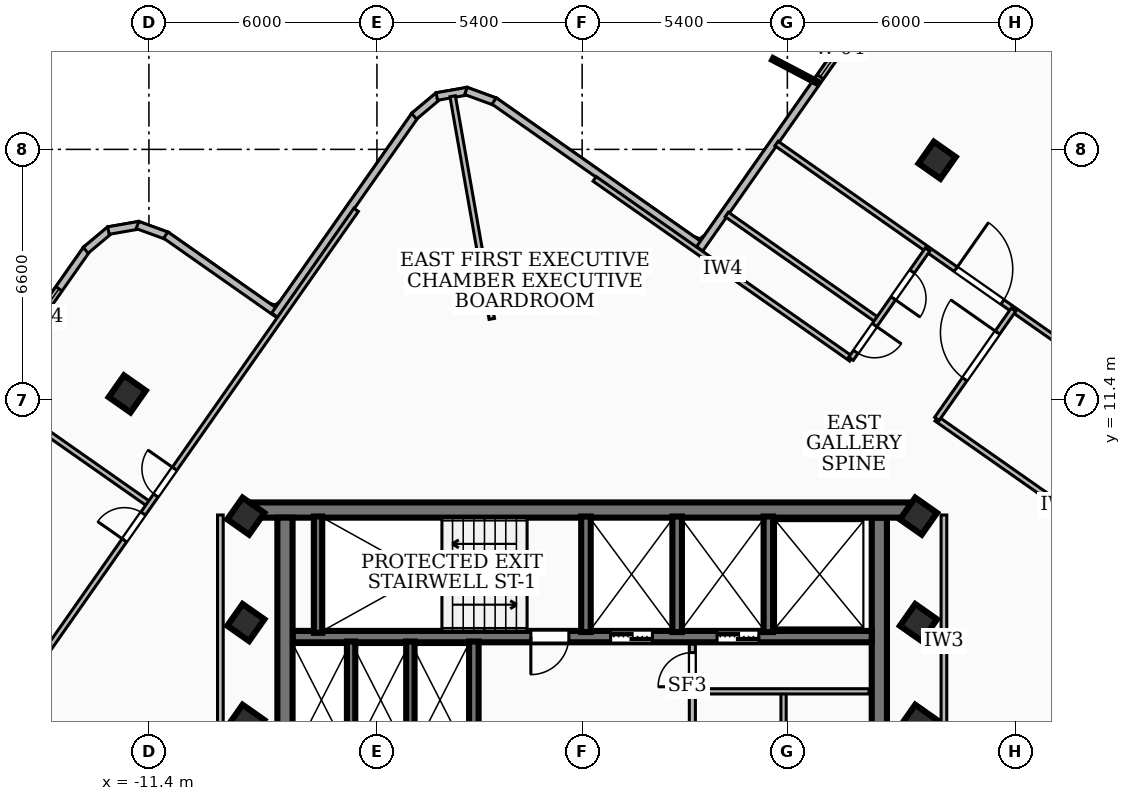
"""IFC4 building model, lengths in metres.
Left out: names, types, materials, properties, quantities, classifications, styles, units other than length and angle.
Written with IfcOpenShell. Run it as: python <this file> out.ifc"""

import sys

from ifc_helpers import new_model, si_unit, direction, frame, frame_2d, origin, origin_2d, place, context, subcontext, project, spatial, rectangle, extrude, element, fill, save


model = new_model("IFC4")
c1 = context("Model", 3, precision=1e-05, world=origin(), true_north=direction((0.0, 1.0)))
c2 = subcontext(c1, "Body", "Model", "MODEL_VIEW")
j1 = project(units=[si_unit("LENGTHUNIT", "METRE"), si_unit("PLANEANGLEUNIT", "RADIAN")], contexts=[c1])
p1 = place(None, origin())
s1 = spatial("IfcSite", under=j1, at=p1, CompositionType="ELEMENT")
p2 = place(p1, origin())
s2 = spatial("IfcBuilding", under=s1, at=p2, CompositionType="ELEMENT")
p3 = place(p2, frame((0.0, 0.0, 264.6)))
s3 = spatial("IfcBuildingStorey", under=s2, at=p3, CompositionType="ELEMENT", Elevation=264.6)
p4 = place(p3, frame((-8.78, 8.51, 0.0), z_axis=(0.0, 0.0, 1.0), x_axis=(1.0, 0.0, 0.0)))
e1 = element("IfcWall", 1, at=p4, inside=s3, PredefinedType="SHEAR", context=c2, shape_type="SweptSolid", body=[
    extrude(rectangle(XDim=17.56, YDim=0.4, at=frame_2d((8.78, 0.0))), origin(), (0.0, 0.0, 1.0), 3.16),
])
for number, where, z_axis, x_axis in (
    (2, (-7.82, 1.95, 0.0), (0.0, 0.0, 1.0), (0.0, 1.0, 0.0)),
    (3, (7.82, 8.31, 0.0), (0.0, 0.0, 1.0), (0.0, -1.0, 0.0)),
):
    element("IfcWall", number, at=place(p3, frame(where, z_axis=z_axis, x_axis=x_axis)), inside=s3, PredefinedType="SHEAR", context=c2, shape_type="SweptSolid", body=[
        extrude(rectangle(XDim=6.36, YDim=0.4, at=frame_2d((3.18, 0.0))), origin(), (0.0, 0.0, 1.0), 3.16),
    ])
p5 = place(p3, frame((7.62, 5.18, 0.0), z_axis=(0.0, 0.0, 1.0), x_axis=(-1.0, 0.0, 0.0)))
e4 = element("IfcWall", 4, at=p5, inside=s3, PredefinedType="SOLIDWALL", context=c2, shape_type="SweptSolid", body=[
    extrude(rectangle(XDim=15.24, YDim=0.3, at=frame_2d((7.62, 0.0))), origin(), (0.0, 0.0, 1.0), 3.16),
])
p6 = place(p5, frame((5.77, 0.0, 0.0)))
e5 = element("IfcOpeningElement", 5, at=p6, cuts=e4, PredefinedType="OPENING", context=c2, shape_type="SweptSolid", body=[
    extrude(rectangle(XDim=1.1, YDim=2.15, at=frame_2d((0.55, 1.075))), frame((0.0, 0.16, 0.0), z_axis=(0.0, -1.0, 0.0), x_axis=(1.0, 0.0, 0.0)), (0.0, 0.0, 1.0), 0.32),
])
p7 = place(p5, frame((2.97, 0.0, 0.0)))
e6 = element("IfcOpeningElement", 6, at=p7, cuts=e4, PredefinedType="OPENING", context=c2, shape_type="SweptSolid", body=[
    extrude(rectangle(XDim=1.1, YDim=2.15, at=frame_2d((0.55, 1.075))), frame((0.0, 0.16, 0.0), z_axis=(0.0, -1.0, 0.0), x_axis=(1.0, 0.0, 0.0)), (0.0, 0.0, 1.0), 0.32),
])
p8 = place(p5, frame((7.97, 0.0, 0.0)))
e7 = element("IfcOpeningElement", 7, at=p8, cuts=e4, PredefinedType="OPENING", context=c2, shape_type="SweptSolid", body=[
    extrude(rectangle(XDim=1.0, YDim=2.1, at=frame_2d((0.5, 1.05))), frame((0.0, 0.16, 0.0), z_axis=(0.0, -1.0, 0.0), x_axis=(1.0, 0.0, 0.0)), (0.0, 0.0, 1.0), 0.32),
])
p9 = place(p3, frame((-6.95, 5.28, 0.0), z_axis=(0.0, 0.0, 1.0), x_axis=(0.0, 1.0, 0.0)))
e8 = element("IfcWall", 8, at=p9, inside=s3, PredefinedType="SOLIDWALL", context=c2, shape_type="SweptSolid", body=[
    extrude(rectangle(XDim=3.06, YDim=0.22, at=frame_2d((1.53, 0.0))), origin(), (0.0, 0.0, 1.0), 3.16),
])
for number, where, z_axis, x_axis in (
    (9, (0.1, 5.3, 0.0), (0.0, 0.0, 1.0), (0.0, 1.0, 0.0)),
    (10, (2.5, 5.3, 0.0), (0.0, 0.0, 1.0), (0.0, 1.0, 0.0)),
    (11, (4.9, 5.3, 0.0), (0.0, 0.0, 1.0), (0.0, 1.0, 0.0)),
):
    element("IfcWall", number, at=place(p3, frame(where, z_axis=z_axis, x_axis=x_axis)), inside=s3, PredefinedType="SOLIDWALL", context=c2, shape_type="SweptSolid", body=[
        extrude(rectangle(XDim=3.04, YDim=0.25, at=frame_2d((1.52, 0.0))), origin(), (0.0, 0.0, 1.0), 3.16),
    ])
p10 = place(p3, frame((-2.85, 1.98, 0.0), z_axis=(0.0, 0.0, 1.0), x_axis=(0.0, 1.0, 0.0)))
e12 = element("IfcWall", 12, at=p10, inside=s3, PredefinedType="SOLIDWALL", context=c2, shape_type="SweptSolid", body=[
    extrude(rectangle(XDim=3.07, YDim=0.25, at=frame_2d((1.535, 0.0))), origin(), (0.0, 0.0, 1.0), 3.16),
])
for number, where, z_axis, x_axis in (
    (13, (-6.08, 1.98, 0.0), (0.0, 0.0, 1.0), (0.0, 1.0, 0.0)),
    (14, (-4.52, 1.98, 0.0), (0.0, 0.0, 1.0), (0.0, 1.0, 0.0)),
):
    element("IfcWall", number, at=place(p3, frame(where, z_axis=z_axis, x_axis=x_axis)), inside=s3, PredefinedType="SOLIDWALL", context=c2, shape_type="SweptSolid", body=[
        extrude(rectangle(XDim=3.07, YDim=0.22, at=frame_2d((1.535, 0.0))), origin(), (0.0, 0.0, 1.0), 3.16),
    ])
for number, where, z_axis, x_axis in (
    (15, (-8.85, 2.9, 0.0), (0.0, 0.0, 1.0), (0.574, 0.819, 0.0)),
    (16, (-8.85, 5.55, 0.0), (0.0, 0.0, 1.0), (0.574, 0.819, 0.0)),
    (17, (8.85, 2.9, 0.0), (0.0, 0.0, 1.0), (0.574, 0.819, 0.0)),
    (18, (8.85, 5.55, 0.0), (0.0, 0.0, 1.0), (0.574, 0.819, 0.0)),
    (19, (-8.85, 8.35, 0.0), (0.0, 0.0, 1.0), (0.574, 0.819, 0.0)),
    (20, (8.85, 8.35, 0.0), (0.0, 0.0, 1.0), (0.574, 0.819, 0.0)),
    (21, (9.341, 17.714, 0.0), (0.0, 0.0, 1.0), (0.574, 0.819, 0.0)),
    (22, (-11.971, 11.566, 0.0), (0.0, 0.0, 1.0), (0.574, 0.819, 0.0)),
):
    element("IfcColumn", number, at=place(p3, frame(where, z_axis=z_axis, x_axis=x_axis)), inside=s3, PredefinedType="COLUMN", context=c2, shape_type="SweptSolid", body=[
        extrude(rectangle(XDim=0.7, YDim=0.7, at=origin_2d()), origin(), (0.0, 0.0, 1.0), 3.42),
    ])
p11 = place(p3, frame((-18.728, 7.257, 0.0), z_axis=(0.0, 0.0, 1.0), x_axis=(0.574152395536, 0.818748451419, 0.0)))
e23 = element("IfcWall", 23, at=p11, inside=s3, PredefinedType="SOLIDWALL", context=c2, shape_type="SweptSolid", body=[
    extrude(rectangle(XDim=9.923, YDim=0.2, at=frame_2d((4.961, 0.0))), origin(), (0.0, 0.0, 1.0), 3.16),
])
p12 = place(p11, frame((6.84, 0.0, 0.85)))
e24 = element("IfcOpeningElement", 24, at=p12, cuts=e23, PredefinedType="OPENING", context=c2, shape_type="SweptSolid", body=[
    extrude(rectangle(XDim=1.8, YDim=2.0, at=frame_2d((0.9, 1.0))), frame((0.0, 0.11, 0.0), z_axis=(0.0, -1.0, 0.0), x_axis=(1.0, 0.0, 0.0)), (0.0, 0.0, 1.0), 0.22),
])
p13 = place(p3, frame((-13.064, 15.345, 0.0), z_axis=(0.0, 0.0, 1.0), x_axis=(0.766330415365, 0.642446647191, 0.0)))
e25 = element("IfcWall", 25, at=p13, inside=s3, PredefinedType="SOLIDWALL", context=c2, shape_type="SweptSolid", body=[
    extrude(rectangle(XDim=0.838, YDim=0.2, at=frame_2d((0.419, 0.0))), origin(), (0.0, 0.0, 1.0), 3.16),
])
p14 = place(p3, frame((-12.466, 15.863, 0.0), z_axis=(0.0, 0.0, 1.0), x_axis=(0.985118245285, 0.171877988141, 0.0)))
e26 = element("IfcWall", 26, at=p14, inside=s3, PredefinedType="SOLIDWALL", context=c2, shape_type="SweptSolid", body=[
    extrude(rectangle(XDim=0.825, YDim=0.2, at=frame_2d((0.413, 0.0))), origin(), (0.0, 0.0, 1.0), 3.16),
])
p15 = place(p3, frame((-11.701, 16.01, 0.0), z_axis=(0.0, 0.0, 1.0), x_axis=(0.939042573482, -0.343800880145, 0.0)))
e27 = element("IfcWall", 27, at=p15, inside=s3, PredefinedType="SOLIDWALL", context=c2, shape_type="SweptSolid", body=[
    extrude(rectangle(XDim=0.838, YDim=0.2, at=frame_2d((0.419, 0.0))), origin(), (0.0, 0.0, 1.0), 3.16),
])
p16 = place(p3, frame((-10.957, 15.745, 0.0), z_axis=(0.0, 0.0, 1.0), x_axis=(0.818576054501, -0.574398157202, 0.0)))
e28 = element("IfcWall", 28, at=p16, inside=s3, PredefinedType="SOLIDWALL", context=c2, shape_type="SweptSolid", body=[
    extrude(rectangle(XDim=3.64, YDim=0.2, at=frame_2d((1.82, 0.0))), origin(), (0.0, 0.0, 1.0), 3.16),
])
p17 = place(p3, frame((-8.088, 13.635, 0.0), z_axis=(0.0, 0.0, 1.0), x_axis=(0.574286279317, 0.818654548261, 0.0)))
e29 = element("IfcWall", 29, at=p17, inside=s3, PredefinedType="SOLIDWALL", context=c2, shape_type="SweptSolid", body=[
    extrude(rectangle(XDim=6.441, YDim=0.2, at=frame_2d((3.22, 0.0))), origin(), (0.0, 0.0, 1.0), 3.16),
])
p18 = place(p3, frame((-4.422, 18.872, 0.0), z_axis=(0.0, 0.0, 1.0), x_axis=(0.766020352528, 0.642816318642, 0.0)))
e30 = element("IfcWall", 30, at=p18, inside=s3, PredefinedType="SOLIDWALL", context=c2, shape_type="SweptSolid", body=[
    extrude(rectangle(XDim=0.838, YDim=0.2, at=frame_2d((0.419, 0.0))), origin(), (0.0, 0.0, 1.0), 3.16),
])
p19 = place(p3, frame((-3.824, 19.391, 0.0), z_axis=(0.0, 0.0, 1.0), x_axis=(0.985118245285, 0.171877988141, 0.0)))
e31 = element("IfcWall", 31, at=p19, inside=s3, PredefinedType="SOLIDWALL", context=c2, shape_type="SweptSolid", body=[
    extrude(rectangle(XDim=0.825, YDim=0.2, at=frame_2d((0.413, 0.0))), origin(), (0.0, 0.0, 1.0), 3.16),
])
p20 = place(p3, frame((-3.059, 19.538, 0.0), z_axis=(0.0, 0.0, 1.0), x_axis=(0.938939131905, -0.344083284363, 0.0)))
e32 = element("IfcWall", 32, at=p20, inside=s3, PredefinedType="SOLIDWALL", context=c2, shape_type="SweptSolid", body=[
    extrude(rectangle(XDim=0.837, YDim=0.2, at=frame_2d((0.418, 0.0))), origin(), (0.0, 0.0, 1.0), 3.16),
])
p21 = place(p3, frame((-2.316, 19.273, 0.0), z_axis=(0.0, 0.0, 1.0), x_axis=(0.818695592978, -0.574227764949, 0.0)))
e33 = element("IfcWall", 33, at=p21, inside=s3, PredefinedType="SOLIDWALL", context=c2, shape_type="SweptSolid", body=[
    extrude(rectangle(XDim=6.741, YDim=0.2, at=frame_2d((3.371, 0.0))), origin(), (0.0, 0.0, 1.0), 3.16),
])
p22 = place(p3, frame((3.092, 15.383, 0.0), z_axis=(0.0, 0.0, 1.0), x_axis=(0.574207723227, 0.818709649746, 0.0)))
e34 = element("IfcWall", 34, at=p22, inside=s3, PredefinedType="SOLIDWALL", context=c2, shape_type="SweptSolid", body=[
    extrude(rectangle(XDim=8.241, YDim=0.2, at=frame_2d((4.12, 0.0))), origin(), (0.0, 0.0, 1.0), 3.16),
])
p23 = place(p22, frame((5.528, 0.0, 0.85)))
e35 = element("IfcOpeningElement", 35, at=p23, cuts=e34, PredefinedType="OPENING", context=c2, shape_type="SweptSolid", body=[
    extrude(rectangle(XDim=1.8, YDim=2.0, at=frame_2d((0.9, 1.0))), frame((0.0, 0.11, 0.0), z_axis=(0.0, -1.0, 0.0), x_axis=(1.0, 0.0, 0.0)), (0.0, 0.0, 1.0), 0.22),
])
p24 = place(p3, frame((9.898, 22.494, 0.0), z_axis=(0.0, 0.0, 1.0), x_axis=(0.818760017785, -0.5741359014, 0.0)))
e36 = element("IfcWall", 36, at=p24, inside=s3, PredefinedType="SOLIDWALL", context=c2, shape_type="SweptSolid", body=[
    extrude(rectangle(XDim=9.922, YDim=0.2, at=frame_2d((4.961, 0.0))), origin(), (0.0, 0.0, 1.0), 3.16),
])
p25 = place(p24, frame((6.84, 0.0, 0.85)))
e37 = element("IfcOpeningElement", 37, at=p25, cuts=e36, PredefinedType="OPENING", context=c2, shape_type="SweptSolid", body=[
    extrude(rectangle(XDim=1.8, YDim=1.8, at=frame_2d((0.9, 0.9))), frame((0.0, 0.11, 0.0), z_axis=(0.0, -1.0, 0.0), x_axis=(1.0, 0.0, 0.0)), (0.0, 0.0, 1.0), 0.22),
])
p26 = place(p3, frame((2.9, 2.04, 0.0), z_axis=(0.0, 0.0, 1.0), x_axis=(0.0, 1.0, 0.0)))
e38 = element("IfcWall", 38, at=p26, inside=s3, PredefinedType="PARTITIONING", context=c2, shape_type="SweptSolid", body=[
    extrude(rectangle(XDim=2.94, YDim=0.16, at=frame_2d((1.47, 0.0))), origin(), (0.0, 0.0, 1.0), 2.39),
])
p27 = place(p26, frame((1.82, 0.0, 0.0)))
e39 = element("IfcOpeningElement", 39, at=p27, cuts=e38, PredefinedType="OPENING", context=c2, shape_type="SweptSolid", body=[
    extrude(rectangle(XDim=0.9, YDim=2.06, at=frame_2d((0.45, 1.03))), frame((0.0, 0.09, 0.0), z_axis=(0.0, -1.0, 0.0), x_axis=(1.0, 0.0, 0.0)), (0.0, 0.0, 1.0), 0.18),
])
p28 = place(p3, frame((2.9, 3.74, 0.0), z_axis=(0.0, 0.0, 1.0), x_axis=(1.0, 0.0, 0.0)))
e40 = element("IfcWall", 40, at=p28, inside=s3, PredefinedType="PARTITIONING", context=c2, shape_type="SweptSolid", body=[
    extrude(rectangle(XDim=4.65, YDim=0.138, at=frame_2d((2.325, 0.0))), origin(), (0.0, 0.0, 1.0), 3.16),
])
p29 = place(p3, frame((5.3, 1.85, 0.0), z_axis=(0.0, 0.0, 1.0), x_axis=(0.0, 1.0, 0.0)))
e41 = element("IfcWall", 41, at=p29, inside=s3, PredefinedType="PARTITIONING", context=c2, shape_type="SweptSolid", body=[
    extrude(rectangle(XDim=1.89, YDim=0.138, at=frame_2d((0.945, 0.0))), origin(), (0.0, 0.0, 1.0), 2.39),
])
p30 = place(p3, frame((-9.52, 1.75, 0.0), z_axis=(0.0, 0.0, 1.0), x_axis=(0.0, 1.0, 0.0)))
e42 = element("IfcWall", 42, at=p30, inside=s3, PredefinedType="PARTITIONING", context=c2, shape_type="SweptSolid", body=[
    extrude(rectangle(XDim=6.63, YDim=0.15, at=frame_2d((3.315, 0.0))), origin(), (0.0, 0.0, 1.0), 2.53),
])
p31 = place(p3, frame((9.52, 1.75, 0.0), z_axis=(0.0, 0.0, 1.0), x_axis=(0.0, 1.0, 0.0)))
e43 = element("IfcWall", 43, at=p31, inside=s3, PredefinedType="PARTITIONING", context=c2, shape_type="SweptSolid", body=[
    extrude(rectangle(XDim=6.63, YDim=0.15, at=frame_2d((3.315, 0.0))), origin(), (0.0, 0.0, 1.0), 3.16),
])
p32 = place(p3, frame((-2.378, 13.54, 0.0), z_axis=(0.0, 0.0, 1.0), x_axis=(-0.173019547247, 0.984918390665, 0.0)))
e44 = element("IfcWall", 44, at=p32, inside=s3, PredefinedType="PARTITIONING", context=c2, shape_type="SweptSolid", body=[
    extrude(rectangle(XDim=5.948, YDim=0.145, at=frame_2d((2.974, 0.0))), origin(), (0.0, 0.0, 1.0), 3.16),
])
p33 = place(p3, frame((11.3, 1.985, 0.0), z_axis=(0.0, 0.0, 1.0), x_axis=(0.984932365377, 0.172939976965, 0.0)))
e45 = element("IfcWall", 45, at=p33, inside=s3, PredefinedType="PARTITIONING", context=c2, shape_type="SweptSolid", body=[
    extrude(rectangle(XDim=8.222, YDim=0.145, at=frame_2d((4.111, 0.0))), origin(), (0.0, 0.0, 1.0), 3.16),
])
p34 = place(p3, frame((7.083, 12.487, 0.0), z_axis=(0.0, 0.0, 1.0), x_axis=(-0.818818791344, 0.574052076855, 0.0)))
e46 = element("IfcWall", 46, at=p34, inside=s3, PredefinedType="PARTITIONING", context=c2, shape_type="SweptSolid", body=[
    extrude(rectangle(XDim=8.25, YDim=0.145, at=frame_2d((4.125, 0.0))), origin(), (0.0, 0.0, 1.0), 3.16),
])
p35 = place(p3, frame((15.835, 6.349, 0.0), z_axis=(0.0, 0.0, 1.0), x_axis=(-0.818780073776, 0.57410729902, 0.0)))
e47 = element("IfcWall", 47, at=p35, inside=s3, PredefinedType="PARTITIONING", context=c2, shape_type="SweptSolid", body=[
    extrude(rectangle(XDim=7.95, YDim=0.145, at=frame_2d((3.975, 0.0))), origin(), (0.0, 0.0, 1.0), 2.53),
])
p36 = place(p3, frame((7.765, 13.511, 0.0), z_axis=(0.0, 0.0, 1.0), x_axis=(-0.818761977847, 0.574133106198, 0.0)))
e48 = element("IfcWall", 48, at=p36, inside=s3, PredefinedType="PARTITIONING", context=c2, shape_type="SweptSolid", body=[
    extrude(rectangle(XDim=4.835, YDim=0.145, at=frame_2d((2.418, 0.0))), origin(), (0.0, 0.0, 1.0), 3.16),
])
p37 = place(p3, frame((9.09, 15.366, 0.0), z_axis=(0.0, 0.0, 1.0), x_axis=(-0.574097025606, -0.81878727713, 0.0)))
e49 = element("IfcWall", 49, at=p37, inside=s3, PredefinedType="PARTITIONING", context=c2, shape_type="SweptSolid", body=[
    extrude(rectangle(XDim=3.51, YDim=0.145, at=frame_2d((1.755, 0.0))), origin(), (0.0, 0.0, 1.0), 3.16),
])
p38 = place(p37, frame((2.43, 0.0, 0.0)))
e50 = element("IfcOpeningElement", 50, at=p38, cuts=e49, PredefinedType="OPENING", context=c2, shape_type="SweptSolid", body=[
    extrude(rectangle(XDim=0.86, YDim=2.04, at=frame_2d((0.43, 1.02))), frame((0.0, 0.083, 0.0), z_axis=(0.0, -1.0, 0.0), x_axis=(1.0, 0.0, 0.0)), (0.0, 0.0, 1.0), 0.165),
])
p39 = place(p37, frame((0.71, 0.0, 0.0)))
e51 = element("IfcOpeningElement", 51, at=p39, cuts=e49, PredefinedType="OPENING", context=c2, shape_type="SweptSolid", body=[
    extrude(rectangle(XDim=0.86, YDim=2.04, at=frame_2d((0.43, 1.02))), frame((0.0, 0.083, 0.0), z_axis=(0.0, -1.0, 0.0), x_axis=(1.0, 0.0, 0.0)), (0.0, 0.0, 1.0), 0.165),
])
p40 = place(p3, frame((9.334, 10.908, 0.0), z_axis=(0.0, 0.0, 1.0), x_axis=(0.574414301793, 0.818564725539, 0.0)))
e52 = element("IfcWall", 52, at=p40, inside=s3, PredefinedType="PARTITIONING", context=c2, shape_type="SweptSolid", body=[
    extrude(rectangle(XDim=3.51, YDim=0.145, at=frame_2d((1.755, 0.0))), origin(), (0.0, 0.0, 1.0), 3.16),
])
p41 = place(p40, frame((1.275, 0.0, 0.0)))
e53 = element("IfcOpeningElement", 53, at=p41, cuts=e52, PredefinedType="OPENING", context=c2, shape_type="SweptSolid", body=[
    extrude(rectangle(XDim=1.5, YDim=2.12, at=frame_2d((0.75, 1.06))), frame((0.0, 0.083, 0.0), z_axis=(0.0, -1.0, 0.0), x_axis=(1.0, 0.0, 0.0)), (0.0, 0.0, 1.0), 0.165),
])
p42 = place(p3, frame((5.115, 18.154, 0.0), z_axis=(0.0, 0.0, 1.0), x_axis=(0.818735813326, -0.574170417191, 0.0)))
e54 = element("IfcWall", 54, at=p42, inside=s3, PredefinedType="PARTITIONING", context=c2, shape_type="SweptSolid", body=[
    extrude(rectangle(XDim=12.77, YDim=0.145, at=frame_2d((6.385, 0.0))), origin(), (0.0, 0.0, 1.0), 2.53),
])
p43 = place(p42, frame((5.76, 0.0, 0.0)))
e55 = element("IfcOpeningElement", 55, at=p43, cuts=e54, PredefinedType="OPENING", context=c2, shape_type="SweptSolid", body=[
    extrude(rectangle(XDim=1.5, YDim=2.12, at=frame_2d((0.75, 1.06))), frame((0.0, 0.083, 0.0), z_axis=(0.0, -1.0, 0.0), x_axis=(1.0, 0.0, 0.0)), (0.0, 0.0, 1.0), 0.165),
])
p44 = place(p3, frame((-11.433, 8.689, 0.0), z_axis=(0.0, 0.0, 1.0), x_axis=(-0.81868341552, 0.574245126363, 0.0)))
e56 = element("IfcWall", 56, at=p44, inside=s3, PredefinedType="PARTITIONING", context=c2, shape_type="SweptSolid", body=[
    extrude(rectangle(XDim=5.085, YDim=0.145, at=frame_2d((2.542, 0.0))), origin(), (0.0, 0.0, 1.0), 3.16),
])
p45 = place(p3, frame((-17.625, -0.245, 0.0), z_axis=(0.0, 0.0, 1.0), x_axis=(0.574126736534, 0.818766444352, 0.0)))
e57 = element("IfcWall", 57, at=p45, inside=s3, PredefinedType="PARTITIONING", context=c2, shape_type="SweptSolid", body=[
    extrude(rectangle(XDim=20.34, YDim=0.145, at=frame_2d((10.17, 0.0))), origin(), (0.0, 0.0, 1.0), 2.53),
])
p46 = place(p45, frame((11.16, 0.0, 0.0)))
e58 = element("IfcOpeningElement", 58, at=p46, cuts=e57, PredefinedType="OPENING", context=c2, shape_type="SweptSolid", body=[
    extrude(rectangle(XDim=0.86, YDim=2.04, at=frame_2d((0.43, 1.02))), frame((0.0, 0.083, 0.0), z_axis=(0.0, -1.0, 0.0), x_axis=(1.0, 0.0, 0.0)), (0.0, 0.0, 1.0), 0.165),
])
p47 = place(p45, frame((9.72, 0.0, 0.0)))
e59 = element("IfcOpeningElement", 59, at=p47, cuts=e57, PredefinedType="OPENING", context=c2, shape_type="SweptSolid", body=[
    extrude(rectangle(XDim=0.86, YDim=2.04, at=frame_2d((0.43, 1.02))), frame((0.0, 0.083, 0.0), z_axis=(0.0, -1.0, 0.0), x_axis=(1.0, 0.0, 0.0)), (0.0, 0.0, 1.0), 0.165),
])
p48 = place(p12, origin())
e60 = element("IfcWindow", 60, at=p48, inside=s3, PartitioningType="SINGLE_PANEL", PredefinedType="WINDOW", context=c2, shape_type="SweptSolid", body=[
    extrude(rectangle(XDim=1.8, YDim=2.0, at=frame_2d((0.9, 1.0))), frame((0.0, 0.03, 0.0), z_axis=(0.0, -1.0, 0.0), x_axis=(1.0, 0.0, 0.0)), (0.0, 0.0, 1.0), 0.06),
])
fill(e24, e60)
p49 = place(p23, origin())
e61 = element("IfcWindow", 61, at=p49, inside=s3, PartitioningType="SINGLE_PANEL", PredefinedType="WINDOW", context=c2, shape_type="SweptSolid", body=[
    extrude(rectangle(XDim=1.8, YDim=2.0, at=frame_2d((0.9, 1.0))), frame((0.0, 0.03, 0.0), z_axis=(0.0, -1.0, 0.0), x_axis=(1.0, 0.0, 0.0)), (0.0, 0.0, 1.0), 0.06),
])
fill(e35, e61)
p50 = place(p6, origin())
e62 = element("IfcDoor", 62, at=p50, inside=s3, OperationType="DOUBLE_DOOR_SLIDING", PredefinedType="DOOR", context=c2, shape_type="SweptSolid", body=[
    extrude(rectangle(XDim=1.1, YDim=2.15, at=frame_2d((0.55, 1.075))), frame((0.0, 0.025, 0.0), z_axis=(0.0, -1.0, 0.0), x_axis=(1.0, 0.0, 0.0)), (0.0, 0.0, 1.0), 0.05),
])
fill(e5, e62)
p51 = place(p7, origin())
e63 = element("IfcDoor", 63, at=p51, inside=s3, OperationType="DOUBLE_DOOR_SLIDING", PredefinedType="DOOR", context=c2, shape_type="SweptSolid", body=[
    extrude(rectangle(XDim=1.1, YDim=2.15, at=frame_2d((0.55, 1.075))), frame((0.0, 0.025, 0.0), z_axis=(0.0, -1.0, 0.0), x_axis=(1.0, 0.0, 0.0)), (0.0, 0.0, 1.0), 0.05),
])
fill(e6, e63)
p52 = place(p8, origin())
e64 = element("IfcDoor", 64, at=p52, inside=s3, OperationType="SINGLE_SWING_RIGHT", PredefinedType="DOOR", context=c2, shape_type="SweptSolid", body=[
    extrude(rectangle(XDim=1.0, YDim=2.1, at=frame_2d((0.5, 1.05))), frame((0.0, 0.025, 0.0), z_axis=(0.0, -1.0, 0.0), x_axis=(1.0, 0.0, 0.0)), (0.0, 0.0, 1.0), 0.05),
])
fill(e7, e64)
p53 = place(p27, origin())
e65 = element("IfcDoor", 65, at=p53, inside=s3, OperationType="SINGLE_SWING_LEFT", PredefinedType="DOOR", context=c2, shape_type="SweptSolid", body=[
    extrude(rectangle(XDim=0.9, YDim=2.06, at=frame_2d((0.45, 1.03))), frame((0.0, 0.025, 0.0), z_axis=(0.0, -1.0, 0.0), x_axis=(1.0, 0.0, 0.0)), (0.0, 0.0, 1.0), 0.05),
])
fill(e39, e65)
p54 = place(p38, origin())
e66 = element("IfcDoor", 66, at=p54, inside=s3, OperationType="SINGLE_SWING_LEFT", PredefinedType="DOOR", context=c2, shape_type="SweptSolid", body=[
    extrude(rectangle(XDim=0.86, YDim=2.04, at=frame_2d((0.43, 1.02))), frame((0.0, 0.025, 0.0), z_axis=(0.0, -1.0, 0.0), x_axis=(1.0, 0.0, 0.0)), (0.0, 0.0, 1.0), 0.05),
])
fill(e50, e66)
p55 = place(p39, origin())
e67 = element("IfcDoor", 67, at=p55, inside=s3, OperationType="SINGLE_SWING_RIGHT", PredefinedType="DOOR", context=c2, shape_type="SweptSolid", body=[
    extrude(rectangle(XDim=0.86, YDim=2.04, at=frame_2d((0.43, 1.02))), frame((0.0, 0.025, 0.0), z_axis=(0.0, -1.0, 0.0), x_axis=(1.0, 0.0, 0.0)), (0.0, 0.0, 1.0), 0.05),
])
fill(e51, e67)
p56 = place(p41, origin())
e68 = element("IfcDoor", 68, at=p56, inside=s3, OperationType="SINGLE_SWING_RIGHT", PredefinedType="DOOR", context=c2, shape_type="SweptSolid", body=[
    extrude(rectangle(XDim=1.5, YDim=2.12, at=frame_2d((0.75, 1.06))), frame((0.0, 0.025, 0.0), z_axis=(0.0, -1.0, 0.0), x_axis=(1.0, 0.0, 0.0)), (0.0, 0.0, 1.0), 0.05),
])
fill(e53, e68)
p57 = place(p43, origin())
e69 = element("IfcDoor", 69, at=p57, inside=s3, OperationType="SINGLE_SWING_LEFT", PredefinedType="DOOR", context=c2, shape_type="SweptSolid", body=[
    extrude(rectangle(XDim=1.5, YDim=2.12, at=frame_2d((0.75, 1.06))), frame((0.0, 0.025, 0.0), z_axis=(0.0, -1.0, 0.0), x_axis=(1.0, 0.0, 0.0)), (0.0, 0.0, 1.0), 0.05),
])
fill(e55, e69)
p58 = place(p46, origin())
e70 = element("IfcDoor", 70, at=p58, inside=s3, OperationType="SINGLE_SWING_RIGHT", PredefinedType="DOOR", context=c2, shape_type="SweptSolid", body=[
    extrude(rectangle(XDim=0.86, YDim=2.04, at=frame_2d((0.43, 1.02))), frame((0.0, 0.025, 0.0), z_axis=(0.0, -1.0, 0.0), x_axis=(1.0, 0.0, 0.0)), (0.0, 0.0, 1.0), 0.05),
])
fill(e58, e70)
p59 = place(p47, origin())
e71 = element("IfcDoor", 71, at=p59, inside=s3, OperationType="SINGLE_SWING_LEFT", PredefinedType="DOOR", context=c2, shape_type="SweptSolid", body=[
    extrude(rectangle(XDim=0.86, YDim=2.04, at=frame_2d((0.43, 1.02))), frame((0.0, 0.025, 0.0), z_axis=(0.0, -1.0, 0.0), x_axis=(1.0, 0.0, 0.0)), (0.0, 0.0, 1.0), 0.05),
])
fill(e59, e71)
save(model, sys.argv[1])
